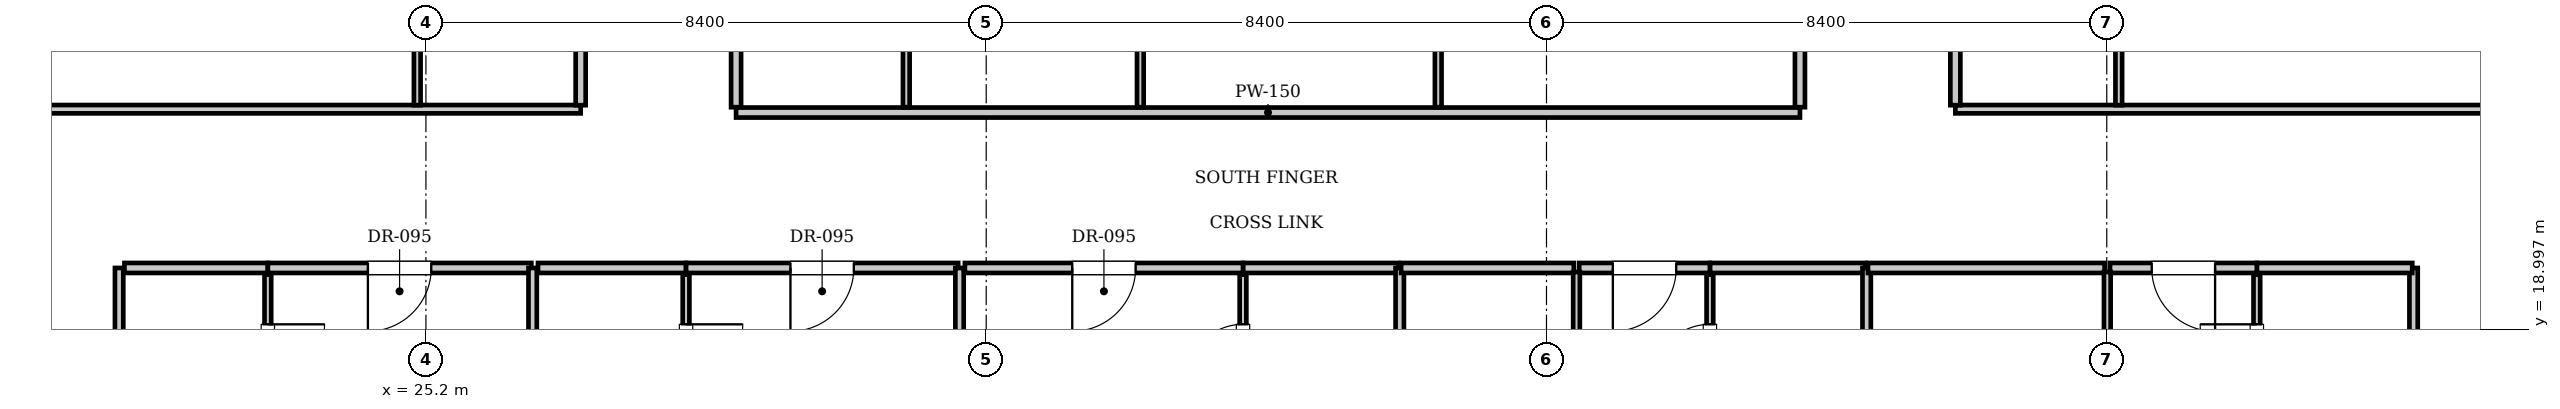
"""IFC4 building model, lengths in metres.
Left out: names, types, materials, properties, quantities, classifications, styles, units other than length and angle.
Written with IfcOpenShell. Run it as: python <this file> out.ifc"""

import sys

from ifc_helpers import new_model, si_unit, direction, frame, frame_2d, origin, place, context, subcontext, project, spatial, rectangle, extrude, element, fill, save


model = new_model("IFC4")
c1 = context("Model", 3, precision=1e-05, world=origin(), true_north=direction((0.0, 1.0)))
c2 = subcontext(c1, "Body", "Model", "MODEL_VIEW")
j1 = project(units=[si_unit("LENGTHUNIT", "METRE"), si_unit("PLANEANGLEUNIT", "RADIAN")], contexts=[c1])
p1 = place(None, origin())
s1 = spatial("IfcSite", under=j1, at=p1, CompositionType="ELEMENT")
p2 = place(p1, origin())
s2 = spatial("IfcBuilding", under=s1, at=p2, CompositionType="ELEMENT")
p3 = place(p2, frame((0.0, 0.0, 293.3)))
s3 = spatial("IfcBuildingStorey", under=s2, at=p3, CompositionType="ELEMENT", Elevation=293.3)
p4 = place(p3, frame((29.85, 22.25, 0.0), z_axis=(0.0, 0.0, 1.0), x_axis=(1.0, 0.0, 0.0)))
e1 = element("IfcWall", 1, at=p4, inside=s3, PredefinedType="PARTITIONING", context=c2, shape_type="SweptSolid", body=[
    extrude(rectangle(XDim=15.95, YDim=0.15, at=frame_2d((7.975, 0.0))), origin(), (0.0, 0.0, 1.0), 3.61),
])
for number, where, z_axis, x_axis in (
    (2, (29.85, 22.33, 0.0), (0.0, 0.0, 1.0), (0.0, 1.0, 0.0)),
    (3, (45.8, 22.33, 0.0), (0.0, 0.0, 1.0), (0.0, 1.0, 0.0)),
):
    element("IfcWall", number, at=place(p3, frame(where, z_axis=z_axis, x_axis=x_axis)), inside=s3, PredefinedType="PARTITIONING", context=c2, shape_type="SweptSolid", body=[
        extrude(rectangle(XDim=7.69, YDim=0.15, at=frame_2d((3.845, 0.0))), origin(), (0.0, 0.0, 1.0), 3.61),
    ])
for number, where, z_axis, x_axis in (
    (4, (32.402, 22.33, 0.0), (0.0, 0.0, 1.0), (0.0, 1.0, 0.0)),
    (5, (35.911, 22.33, 0.0), (0.0, 0.0, 1.0), (0.0, 1.0, 0.0)),
    (6, (40.377, 22.33, 0.0), (0.0, 0.0, 1.0), (0.0, 1.0, 0.0)),
):
    element("IfcWall", number, at=place(p3, frame(where, z_axis=z_axis, x_axis=x_axis)), inside=s3, PredefinedType="PARTITIONING", context=c2, shape_type="SweptSolid", body=[
        extrude(rectangle(XDim=7.69, YDim=0.1, at=frame_2d((3.845, 0.0))), origin(), (0.0, 0.0, 1.0), 3.61),
    ])
for number, where, z_axis, x_axis in (
    (7, (20.6, 14.4, 0.0), (0.0, 0.0, 1.0), (0.0, 1.0, 0.0)),
    (8, (55.0, 14.4, 0.0), (0.0, 0.0, 1.0), (0.0, 1.0, 0.0)),
):
    element("IfcWall", number, at=place(p3, frame(where, z_axis=z_axis, x_axis=x_axis)), inside=s3, PredefinedType="PARTITIONING", context=c2, shape_type="SweptSolid", body=[
        extrude(rectangle(XDim=5.52, YDim=0.125, at=frame_2d((2.76, 0.0))), origin(), (0.0, 0.0, 1.0), 3.61),
    ])
p5 = place(p3, frame((20.68, 19.92, 0.0), z_axis=(0.0, 0.0, 1.0), x_axis=(1.0, 0.0, 0.0)))
e9 = element("IfcWall", 9, at=p5, inside=s3, PredefinedType="PARTITIONING", context=c2, shape_type="SweptSolid", body=[
    extrude(rectangle(XDim=2.15, YDim=0.15, at=frame_2d((1.075, 0.0))), origin(), (0.0, 0.0, 1.0), 3.61),
])
p6 = place(p3, frame((22.83, 17.48, 0.0), z_axis=(0.0, 0.0, 1.0), x_axis=(0.0, 1.0, 0.0)))
e10 = element("IfcWall", 10, at=p6, inside=s3, PredefinedType="PARTITIONING", context=c2, shape_type="SweptSolid", body=[
    extrude(rectangle(XDim=2.34, YDim=0.1, at=frame_2d((1.17, 0.0))), origin(), (0.0, 0.0, 1.0), 3.61),
])
p7 = place(p6, frame((0.745, 0.0, 0.0)))
e11 = element("IfcOpeningElement", 11, at=p7, cuts=e10, PredefinedType="OPENING", context=c2, shape_type="SweptSolid", body=[
    extrude(rectangle(XDim=0.85, YDim=2.1, at=frame_2d((0.425, 1.05))), frame((0.0, 0.06, 0.0), z_axis=(0.0, -1.0, 0.0), x_axis=(1.0, 0.0, 0.0)), (0.0, 0.0, 1.0), 0.12),
])
p8 = place(p3, frame((22.83, 19.92, 0.0), z_axis=(0.0, 0.0, 1.0), x_axis=(1.0, 0.0, 0.0)))
e12 = element("IfcWall", 12, at=p8, inside=s3, PredefinedType="PARTITIONING", context=c2, shape_type="SweptSolid", body=[
    extrude(rectangle(XDim=3.95, YDim=0.15, at=frame_2d((1.975, 0.0))), origin(), (0.0, 0.0, 1.0), 3.61),
])
p9 = place(p8, frame((1.5, 0.0, 0.0)))
e13 = element("IfcOpeningElement", 13, at=p9, cuts=e12, PredefinedType="OPENING", context=c2, shape_type="SweptSolid", body=[
    extrude(rectangle(XDim=0.95, YDim=2.15, at=frame_2d((0.475, 1.075))), frame((0.0, 0.085, 0.0), z_axis=(0.0, -1.0, 0.0), x_axis=(1.0, 0.0, 0.0)), (0.0, 0.0, 1.0), 0.17),
])
p10 = place(p3, frame((26.8, 9.3, 0.0), z_axis=(0.0, 0.0, 1.0), x_axis=(0.0, 1.0, 0.0)))
e14 = element("IfcWall", 14, at=p10, inside=s3, PredefinedType="PARTITIONING", context=c2, shape_type="SweptSolid", body=[
    extrude(rectangle(XDim=10.62, YDim=0.125, at=frame_2d((5.31, 0.0))), origin(), (0.0, 0.0, 1.0), 3.61),
])
p11 = place(p3, frame((26.88, 19.92, 0.0), z_axis=(0.0, 0.0, 1.0), x_axis=(1.0, 0.0, 0.0)))
e15 = element("IfcWall", 15, at=p11, inside=s3, PredefinedType="PARTITIONING", context=c2, shape_type="SweptSolid", body=[
    extrude(rectangle(XDim=2.22, YDim=0.15, at=frame_2d((1.11, 0.0))), origin(), (0.0, 0.0, 1.0), 3.61),
])
p12 = place(p3, frame((29.1, 17.48, 0.0), z_axis=(0.0, 0.0, 1.0), x_axis=(0.0, 1.0, 0.0)))
e16 = element("IfcWall", 16, at=p12, inside=s3, PredefinedType="PARTITIONING", context=c2, shape_type="SweptSolid", body=[
    extrude(rectangle(XDim=2.34, YDim=0.1, at=frame_2d((1.17, 0.0))), origin(), (0.0, 0.0, 1.0), 3.61),
])
p13 = place(p12, frame((0.745, 0.0, 0.0)))
e17 = element("IfcOpeningElement", 17, at=p13, cuts=e16, PredefinedType="OPENING", context=c2, shape_type="SweptSolid", body=[
    extrude(rectangle(XDim=0.85, YDim=2.1, at=frame_2d((0.425, 1.05))), frame((0.0, 0.06, 0.0), z_axis=(0.0, -1.0, 0.0), x_axis=(1.0, 0.0, 0.0)), (0.0, 0.0, 1.0), 0.12),
])
p14 = place(p3, frame((29.1, 19.92, 0.0), z_axis=(0.0, 0.0, 1.0), x_axis=(1.0, 0.0, 0.0)))
e18 = element("IfcWall", 18, at=p14, inside=s3, PredefinedType="PARTITIONING", context=c2, shape_type="SweptSolid", body=[
    extrude(rectangle(XDim=4.08, YDim=0.15, at=frame_2d((2.04, 0.0))), origin(), (0.0, 0.0, 1.0), 3.61),
])
p15 = place(p14, frame((1.565, 0.0, 0.0)))
e19 = element("IfcOpeningElement", 19, at=p15, cuts=e18, PredefinedType="OPENING", context=c2, shape_type="SweptSolid", body=[
    extrude(rectangle(XDim=0.95, YDim=2.15, at=frame_2d((0.475, 1.075))), frame((0.0, 0.085, 0.0), z_axis=(0.0, -1.0, 0.0), x_axis=(1.0, 0.0, 0.0)), (0.0, 0.0, 1.0), 0.17),
])
p16 = place(p3, frame((33.2, 9.3, 0.0), z_axis=(0.0, 0.0, 1.0), x_axis=(0.0, 1.0, 0.0)))
e20 = element("IfcWall", 20, at=p16, inside=s3, PredefinedType="PARTITIONING", context=c2, shape_type="SweptSolid", body=[
    extrude(rectangle(XDim=10.62, YDim=0.125, at=frame_2d((5.31, 0.0))), origin(), (0.0, 0.0, 1.0), 3.61),
])
p17 = place(p3, frame((37.45, 19.92, 0.0), z_axis=(0.0, 0.0, 1.0), x_axis=(1.0, 0.0, 0.0)))
e21 = element("IfcWall", 21, at=p17, inside=s3, PredefinedType="PARTITIONING", context=c2, shape_type="SweptSolid", body=[
    extrude(rectangle(XDim=2.33, YDim=0.15, at=frame_2d((1.165, 0.0))), origin(), (0.0, 0.0, 1.0), 3.61),
])
p18 = place(p3, frame((37.45, 17.48, 0.0), z_axis=(0.0, 0.0, 1.0), x_axis=(0.0, 1.0, 0.0)))
e22 = element("IfcWall", 22, at=p18, inside=s3, PredefinedType="PARTITIONING", context=c2, shape_type="SweptSolid", body=[
    extrude(rectangle(XDim=2.34, YDim=0.1, at=frame_2d((1.17, 0.0))), origin(), (0.0, 0.0, 1.0), 3.61),
])
p19 = place(p18, frame((0.745, 0.0, 0.0)))
e23 = element("IfcOpeningElement", 23, at=p19, cuts=e22, PredefinedType="OPENING", context=c2, shape_type="SweptSolid", body=[
    extrude(rectangle(XDim=0.85, YDim=2.1, at=frame_2d((0.425, 1.05))), frame((0.0, 0.06, 0.0), z_axis=(0.0, -1.0, 0.0), x_axis=(1.0, 0.0, 0.0)), (0.0, 0.0, 1.0), 0.12),
])
p20 = place(p3, frame((33.28, 19.92, 0.0), z_axis=(0.0, 0.0, 1.0), x_axis=(1.0, 0.0, 0.0)))
e24 = element("IfcWall", 24, at=p20, inside=s3, PredefinedType="PARTITIONING", context=c2, shape_type="SweptSolid", body=[
    extrude(rectangle(XDim=4.17, YDim=0.15, at=frame_2d((2.085, 0.0))), origin(), (0.0, 0.0, 1.0), 3.61),
])
p21 = place(p20, frame((1.61, 0.0, 0.0)))
e25 = element("IfcOpeningElement", 25, at=p21, cuts=e24, PredefinedType="OPENING", context=c2, shape_type="SweptSolid", body=[
    extrude(rectangle(XDim=0.95, YDim=2.15, at=frame_2d((0.475, 1.075))), frame((0.0, 0.085, 0.0), z_axis=(0.0, -1.0, 0.0), x_axis=(1.0, 0.0, 0.0)), (0.0, 0.0, 1.0), 0.17),
])
p22 = place(p3, frame((39.8, 9.3, 0.0), z_axis=(0.0, 0.0, 1.0), x_axis=(0.0, 1.0, 0.0)))
e26 = element("IfcWall", 26, at=p22, inside=s3, PredefinedType="PARTITIONING", context=c2, shape_type="SweptSolid", body=[
    extrude(rectangle(XDim=10.62, YDim=0.125, at=frame_2d((5.31, 0.0))), origin(), (0.0, 0.0, 1.0), 3.61),
])
p23 = place(p3, frame((44.45, 19.92, 0.0), z_axis=(0.0, 0.0, 1.0), x_axis=(1.0, 0.0, 0.0)))
e27 = element("IfcWall", 27, at=p23, inside=s3, PredefinedType="PARTITIONING", context=c2, shape_type="SweptSolid", body=[
    extrude(rectangle(XDim=2.33, YDim=0.15, at=frame_2d((1.165, 0.0))), origin(), (0.0, 0.0, 1.0), 3.61),
])
p24 = place(p3, frame((44.45, 17.48, 0.0), z_axis=(0.0, 0.0, 1.0), x_axis=(0.0, 1.0, 0.0)))
e28 = element("IfcWall", 28, at=p24, inside=s3, PredefinedType="PARTITIONING", context=c2, shape_type="SweptSolid", body=[
    extrude(rectangle(XDim=2.34, YDim=0.1, at=frame_2d((1.17, 0.0))), origin(), (0.0, 0.0, 1.0), 3.61),
])
p25 = place(p24, frame((0.745, 0.0, 0.0)))
e29 = element("IfcOpeningElement", 29, at=p25, cuts=e28, PredefinedType="OPENING", context=c2, shape_type="SweptSolid", body=[
    extrude(rectangle(XDim=0.85, YDim=2.1, at=frame_2d((0.425, 1.05))), frame((0.0, 0.06, 0.0), z_axis=(0.0, -1.0, 0.0), x_axis=(1.0, 0.0, 0.0)), (0.0, 0.0, 1.0), 0.12),
])
p26 = place(p3, frame((39.82, 19.92, 0.0), z_axis=(0.0, 0.0, 1.0), x_axis=(1.0, 0.0, 0.0)))
e30 = element("IfcWall", 30, at=p26, inside=s3, PredefinedType="PARTITIONING", context=c2, shape_type="SweptSolid", body=[
    extrude(rectangle(XDim=2.59, YDim=0.15, at=frame_2d((1.295, 0.0))), origin(), (0.0, 0.0, 1.0), 3.61),
])
p27 = place(p3, frame((42.49, 19.92, 0.0), z_axis=(0.0, 0.0, 1.0), x_axis=(1.0, 0.0, 0.0)))
e31 = element("IfcWall", 31, at=p27, inside=s3, PredefinedType="PARTITIONING", context=c2, shape_type="SweptSolid", body=[
    extrude(rectangle(XDim=1.96, YDim=0.15, at=frame_2d((0.98, 0.0))), origin(), (0.0, 0.0, 1.0), 3.61),
])
p28 = place(p27, frame((0.505, 0.0, 0.0)))
e32 = element("IfcOpeningElement", 32, at=p28, cuts=e31, PredefinedType="OPENING", context=c2, shape_type="SweptSolid", body=[
    extrude(rectangle(XDim=0.95, YDim=2.15, at=frame_2d((0.475, 1.075))), frame((0.0, 0.085, 0.0), z_axis=(0.0, -1.0, 0.0), x_axis=(1.0, 0.0, 0.0)), (0.0, 0.0, 1.0), 0.17),
])
p29 = place(p3, frame((42.45, 9.23, 0.0), z_axis=(0.0, 0.0, 1.0), x_axis=(0.0, 1.0, 0.0)))
e33 = element("IfcWall", 33, at=p29, inside=s3, PredefinedType="PARTITIONING", context=c2, shape_type="SweptSolid", body=[
    extrude(rectangle(XDim=10.63, YDim=0.1, at=frame_2d((5.315, 0.0))), origin(), (0.0, 0.0, 1.0), 3.61),
])
p30 = place(p29, frame((1.6, 0.0, 0.0)))
e34 = element("IfcOpeningElement", 34, at=p30, cuts=e33, PredefinedType="OPENING", context=c2, shape_type="SweptSolid", body=[
    extrude(rectangle(XDim=0.9, YDim=2.1, at=frame_2d((0.45, 1.05))), frame((0.0, 0.06, 0.0), z_axis=(0.0, -1.0, 0.0), x_axis=(1.0, 0.0, 0.0)), (0.0, 0.0, 1.0), 0.12),
])
p31 = place(p3, frame((46.8, 9.3, 0.0), z_axis=(0.0, 0.0, 1.0), x_axis=(0.0, 1.0, 0.0)))
e35 = element("IfcWall", 35, at=p31, inside=s3, PredefinedType="PARTITIONING", context=c2, shape_type="SweptSolid", body=[
    extrude(rectangle(XDim=10.62, YDim=0.125, at=frame_2d((5.31, 0.0))), origin(), (0.0, 0.0, 1.0), 3.61),
])
p32 = place(p3, frame((52.65, 19.92, 0.0), z_axis=(0.0, 0.0, 1.0), x_axis=(1.0, 0.0, 0.0)))
e36 = element("IfcWall", 36, at=p32, inside=s3, PredefinedType="PARTITIONING", context=c2, shape_type="SweptSolid", body=[
    extrude(rectangle(XDim=2.33, YDim=0.15, at=frame_2d((1.165, 0.0))), origin(), (0.0, 0.0, 1.0), 3.61),
])
p33 = place(p3, frame((52.65, 17.48, 0.0), z_axis=(0.0, 0.0, 1.0), x_axis=(0.0, 1.0, 0.0)))
e37 = element("IfcWall", 37, at=p33, inside=s3, PredefinedType="PARTITIONING", context=c2, shape_type="SweptSolid", body=[
    extrude(rectangle(XDim=2.34, YDim=0.1, at=frame_2d((1.17, 0.0))), origin(), (0.0, 0.0, 1.0), 3.61),
])
p34 = place(p33, frame((0.745, 0.0, 0.0)))
e38 = element("IfcOpeningElement", 38, at=p34, cuts=e37, PredefinedType="OPENING", context=c2, shape_type="SweptSolid", body=[
    extrude(rectangle(XDim=0.85, YDim=2.1, at=frame_2d((0.425, 1.05))), frame((0.0, 0.06, 0.0), z_axis=(0.0, -1.0, 0.0), x_axis=(1.0, 0.0, 0.0)), (0.0, 0.0, 1.0), 0.12),
])
p35 = place(p3, frame((46.82, 19.92, 0.0), z_axis=(0.0, 0.0, 1.0), x_axis=(1.0, 0.0, 0.0)))
e39 = element("IfcWall", 39, at=p35, inside=s3, PredefinedType="PARTITIONING", context=c2, shape_type="SweptSolid", body=[
    extrude(rectangle(XDim=3.548, YDim=0.15, at=frame_2d((1.774, 0.0))), origin(), (0.0, 0.0, 1.0), 3.61),
])
p36 = place(p3, frame((50.448, 19.92, 0.0), z_axis=(0.0, 0.0, 1.0), x_axis=(1.0, 0.0, 0.0)))
e40 = element("IfcWall", 40, at=p36, inside=s3, PredefinedType="PARTITIONING", context=c2, shape_type="SweptSolid", body=[
    extrude(rectangle(XDim=2.202, YDim=0.15, at=frame_2d((1.101, 0.0))), origin(), (0.0, 0.0, 1.0), 3.61),
])
p37 = place(p36, frame((0.626, 0.0, 0.0)))
e41 = element("IfcOpeningElement", 41, at=p37, cuts=e40, PredefinedType="OPENING", context=c2, shape_type="SweptSolid", body=[
    extrude(rectangle(XDim=0.95, YDim=2.15, at=frame_2d((0.475, 1.075))), frame((0.0, 0.085, 0.0), z_axis=(0.0, -1.0, 0.0), x_axis=(1.0, 0.0, 0.0)), (0.0, 0.0, 1.0), 0.17),
])
p38 = place(p3, frame((50.408, 9.23, 0.0), z_axis=(0.0, 0.0, 1.0), x_axis=(0.0, 1.0, 0.0)))
e42 = element("IfcWall", 42, at=p38, inside=s3, PredefinedType="PARTITIONING", context=c2, shape_type="SweptSolid", body=[
    extrude(rectangle(XDim=10.63, YDim=0.1, at=frame_2d((5.315, 0.0))), origin(), (0.0, 0.0, 1.0), 3.081),
])
p39 = place(p38, frame((1.6, 0.0, 0.0)))
e43 = element("IfcOpeningElement", 43, at=p39, cuts=e42, PredefinedType="OPENING", context=c2, shape_type="SweptSolid", body=[
    extrude(rectangle(XDim=0.9, YDim=2.1, at=frame_2d((0.45, 1.05))), frame((0.0, 0.06, 0.0), z_axis=(0.0, -1.0, 0.0), x_axis=(1.0, 0.0, 0.0)), (0.0, 0.0, 1.0), 0.12),
])
p40 = place(p3, frame((15.5, 22.3, 0.0), z_axis=(0.0, 0.0, 1.0), x_axis=(1.0, 0.0, 0.0)))
e44 = element("IfcWall", 44, at=p40, inside=s3, PredefinedType="PARTITIONING", context=c2, shape_type="SweptSolid", body=[
    extrude(rectangle(XDim=12.02, YDim=0.125, at=frame_2d((6.01, 0.0))), origin(), (0.0, 0.0, 1.0), 3.61),
])
p41 = place(p3, frame((48.13, 22.3, 0.0), z_axis=(0.0, 0.0, 1.0), x_axis=(1.0, 0.0, 0.0)))
e45 = element("IfcWall", 45, at=p41, inside=s3, PredefinedType="PARTITIONING", context=c2, shape_type="SweptSolid", body=[
    extrude(rectangle(XDim=11.97, YDim=0.125, at=frame_2d((5.985, 0.0))), origin(), (0.0, 0.0, 1.0), 3.61),
])
p42 = place(p3, frame((27.52, 22.36, 0.0), z_axis=(0.0, 0.0, 1.0), x_axis=(0.0, 1.0, 0.0)))
e46 = element("IfcWall", 46, at=p42, inside=s3, PredefinedType="PARTITIONING", context=c2, shape_type="SweptSolid", body=[
    extrude(rectangle(XDim=1.89, YDim=0.15, at=frame_2d((0.945, 0.0))), origin(), (0.0, 0.0, 1.0), 3.61),
])
p43 = place(p3, frame((25.07, 22.36, 0.0), z_axis=(0.0, 0.0, 1.0), x_axis=(0.0, 1.0, 0.0)))
e47 = element("IfcWall", 47, at=p43, inside=s3, PredefinedType="PARTITIONING", context=c2, shape_type="SweptSolid", body=[
    extrude(rectangle(XDim=1.89, YDim=0.1, at=frame_2d((0.945, 0.0))), origin(), (0.0, 0.0, 1.0), 3.61),
])
p44 = place(p3, frame((48.13, 22.36, 0.0), z_axis=(0.0, 0.0, 1.0), x_axis=(0.0, 1.0, 0.0)))
e48 = element("IfcWall", 48, at=p44, inside=s3, PredefinedType="PARTITIONING", context=c2, shape_type="SweptSolid", body=[
    extrude(rectangle(XDim=1.89, YDim=0.15, at=frame_2d((0.945, 0.0))), origin(), (0.0, 0.0, 1.0), 3.61),
])
p45 = place(p3, frame((50.58, 22.36, 0.0), z_axis=(0.0, 0.0, 1.0), x_axis=(0.0, 1.0, 0.0)))
e49 = element("IfcWall", 49, at=p45, inside=s3, PredefinedType="PARTITIONING", context=c2, shape_type="SweptSolid", body=[
    extrude(rectangle(XDim=1.89, YDim=0.1, at=frame_2d((0.945, 0.0))), origin(), (0.0, 0.0, 1.0), 3.61),
])
p46 = place(p7, frame((0.85, 0.0, 0.0), z_axis=(0.0, 0.0, 1.0), x_axis=(-1.0, 0.0, 0.0)))
e50 = element("IfcDoor", 50, at=p46, inside=s3, OperationType="SINGLE_SWING_LEFT", PredefinedType="DOOR", context=c2, shape_type="SweptSolid", body=[
    extrude(rectangle(XDim=0.85, YDim=2.1, at=frame_2d((0.425, 1.05))), frame((0.0, 0.025, 0.0), z_axis=(0.0, -1.0, 0.0), x_axis=(1.0, 0.0, 0.0)), (0.0, 0.0, 1.0), 0.05),
])
fill(e11, e50)
p47 = place(p9, frame((0.95, 0.0, 0.0), z_axis=(0.0, 0.0, 1.0), x_axis=(-1.0, 0.0, 0.0)))
e51 = element("IfcDoor", 51, at=p47, inside=s3, OperationType="SINGLE_SWING_RIGHT", PredefinedType="DOOR", context=c2, shape_type="SweptSolid", body=[
    extrude(rectangle(XDim=0.95, YDim=2.15, at=frame_2d((0.475, 1.075))), frame((0.0, 0.025, 0.0), z_axis=(0.0, -1.0, 0.0), x_axis=(1.0, 0.0, 0.0)), (0.0, 0.0, 1.0), 0.05),
])
fill(e13, e51)
p48 = place(p13, frame((0.85, 0.0, 0.0), z_axis=(0.0, 0.0, 1.0), x_axis=(-1.0, 0.0, 0.0)))
e52 = element("IfcDoor", 52, at=p48, inside=s3, OperationType="SINGLE_SWING_LEFT", PredefinedType="DOOR", context=c2, shape_type="SweptSolid", body=[
    extrude(rectangle(XDim=0.85, YDim=2.1, at=frame_2d((0.425, 1.05))), frame((0.0, 0.025, 0.0), z_axis=(0.0, -1.0, 0.0), x_axis=(1.0, 0.0, 0.0)), (0.0, 0.0, 1.0), 0.05),
])
fill(e17, e52)
p49 = place(p15, frame((0.95, 0.0, 0.0), z_axis=(0.0, 0.0, 1.0), x_axis=(-1.0, 0.0, 0.0)))
e53 = element("IfcDoor", 53, at=p49, inside=s3, OperationType="SINGLE_SWING_RIGHT", PredefinedType="DOOR", context=c2, shape_type="SweptSolid", body=[
    extrude(rectangle(XDim=0.95, YDim=2.15, at=frame_2d((0.475, 1.075))), frame((0.0, 0.025, 0.0), z_axis=(0.0, -1.0, 0.0), x_axis=(1.0, 0.0, 0.0)), (0.0, 0.0, 1.0), 0.05),
])
fill(e19, e53)
p50 = place(p19, origin())
e54 = element("IfcDoor", 54, at=p50, inside=s3, OperationType="SINGLE_SWING_LEFT", PredefinedType="DOOR", context=c2, shape_type="SweptSolid", body=[
    extrude(rectangle(XDim=0.85, YDim=2.1, at=frame_2d((0.425, 1.05))), frame((0.0, 0.025, 0.0), z_axis=(0.0, -1.0, 0.0), x_axis=(1.0, 0.0, 0.0)), (0.0, 0.0, 1.0), 0.05),
])
fill(e23, e54)
p51 = place(p21, frame((0.95, 0.0, 0.0), z_axis=(0.0, 0.0, 1.0), x_axis=(-1.0, 0.0, 0.0)))
e55 = element("IfcDoor", 55, at=p51, inside=s3, OperationType="SINGLE_SWING_RIGHT", PredefinedType="DOOR", context=c2, shape_type="SweptSolid", body=[
    extrude(rectangle(XDim=0.95, YDim=2.15, at=frame_2d((0.475, 1.075))), frame((0.0, 0.025, 0.0), z_axis=(0.0, -1.0, 0.0), x_axis=(1.0, 0.0, 0.0)), (0.0, 0.0, 1.0), 0.05),
])
fill(e25, e55)
p52 = place(p25, origin())
e56 = element("IfcDoor", 56, at=p52, inside=s3, OperationType="SINGLE_SWING_LEFT", PredefinedType="DOOR", context=c2, shape_type="SweptSolid", body=[
    extrude(rectangle(XDim=0.85, YDim=2.1, at=frame_2d((0.425, 1.05))), frame((0.0, 0.025, 0.0), z_axis=(0.0, -1.0, 0.0), x_axis=(1.0, 0.0, 0.0)), (0.0, 0.0, 1.0), 0.05),
])
fill(e29, e56)
p53 = place(p28, frame((0.95, 0.0, 0.0), z_axis=(0.0, 0.0, 1.0), x_axis=(-1.0, 0.0, 0.0)))
e57 = element("IfcDoor", 57, at=p53, inside=s3, OperationType="SINGLE_SWING_RIGHT", PredefinedType="DOOR", context=c2, shape_type="SweptSolid", body=[
    extrude(rectangle(XDim=0.95, YDim=2.15, at=frame_2d((0.475, 1.075))), frame((0.0, 0.025, 0.0), z_axis=(0.0, -1.0, 0.0), x_axis=(1.0, 0.0, 0.0)), (0.0, 0.0, 1.0), 0.05),
])
fill(e32, e57)
p54 = place(p34, origin())
e58 = element("IfcDoor", 58, at=p54, inside=s3, OperationType="SINGLE_SWING_RIGHT", PredefinedType="DOOR", context=c2, shape_type="SweptSolid", body=[
    extrude(rectangle(XDim=0.85, YDim=2.1, at=frame_2d((0.425, 1.05))), frame((0.0, 0.025, 0.0), z_axis=(0.0, -1.0, 0.0), x_axis=(1.0, 0.0, 0.0)), (0.0, 0.0, 1.0), 0.05),
])
fill(e38, e58)
p55 = place(p37, frame((0.95, 0.0, 0.0), z_axis=(0.0, 0.0, 1.0), x_axis=(-1.0, 0.0, 0.0)))
e59 = element("IfcDoor", 59, at=p55, inside=s3, OperationType="SINGLE_SWING_LEFT", PredefinedType="DOOR", context=c2, shape_type="SweptSolid", body=[
    extrude(rectangle(XDim=0.95, YDim=2.15, at=frame_2d((0.475, 1.075))), frame((0.0, 0.025, 0.0), z_axis=(0.0, -1.0, 0.0), x_axis=(1.0, 0.0, 0.0)), (0.0, 0.0, 1.0), 0.05),
])
fill(e41, e59)
save(model, sys.argv[1])
